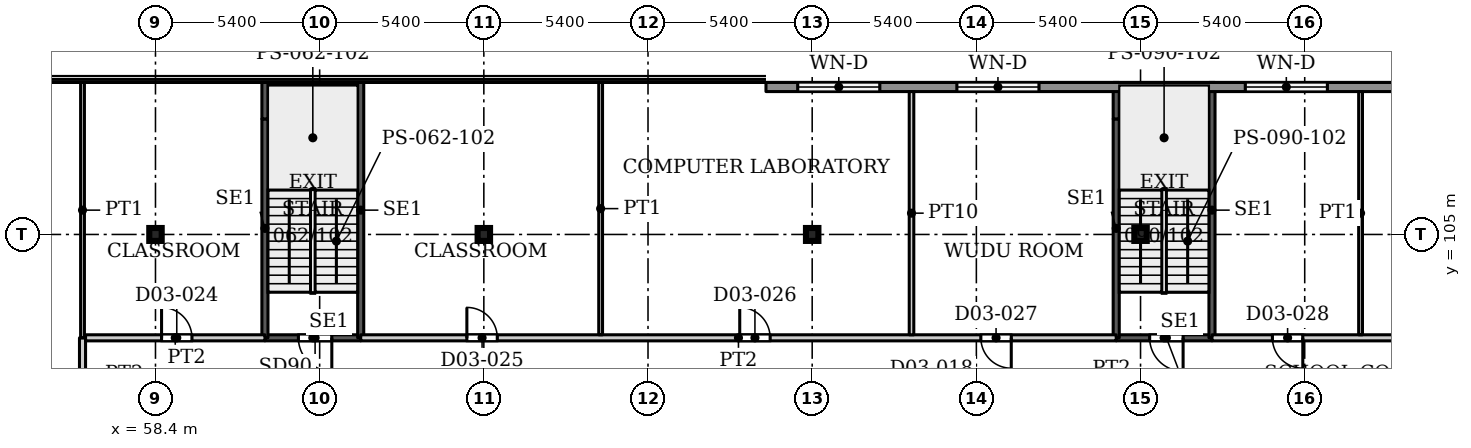
"""IFC4 building model, lengths in metres.
Left out: names, types, materials, properties, quantities, classifications, styles, units other than length and angle.
Written with IfcOpenShell. Run it as: python <this file> out.ifc"""

import sys

from ifc_helpers import new_model, si_unit, direction, frame, frame_2d, origin, origin_2d, place, context, subcontext, project, spatial, rectangle, i_section, extrude, source, transform, mapped, element, fill, save


model = new_model("IFC4")
c1 = context("Model", 3, precision=1e-05, world=origin(), true_north=direction((0.0, 1.0)))
c2 = subcontext(c1, "Body", "Model", "MODEL_VIEW")
j1 = project(units=[si_unit("LENGTHUNIT", "METRE"), si_unit("PLANEANGLEUNIT", "RADIAN")], contexts=[c1])
p1 = place(None, origin())
s1 = spatial("IfcSite", under=j1, at=p1, CompositionType="ELEMENT")
p2 = place(p1, origin())
s2 = spatial("IfcBuilding", under=s1, at=p2, CompositionType="ELEMENT")
p3 = place(p2, frame((0.0, 0.0, 17.0)))
s3 = spatial("IfcBuildingStorey", under=s2, at=p3, CompositionType="ELEMENT", Elevation=17.0)
for number, where, z_axis, x_axis in (
    (1, (58.4, 105.0, 0.0), (0.0, 0.0, 1.0), (1.0, 0.0, 0.0)),
    (2, (69.2, 105.0, 0.0), (0.0, 0.0, 1.0), (1.0, 0.0, 0.0)),
    (3, (80.0, 105.0, 0.0), (0.0, 0.0, 1.0), (1.0, 0.0, 0.0)),
    (4, (90.8, 105.0, 0.0), (0.0, 0.0, 1.0), (1.0, 0.0, 0.0)),
):
    element("IfcColumn", number, at=place(p3, frame(where, z_axis=z_axis, x_axis=x_axis)), inside=s3, PredefinedType="COLUMN", context=c2, shape_type="SweptSolid", body=[
        extrude(i_section(OverallWidth=0.409, OverallDepth=0.425, WebThickness=0.033, FlangeThickness=0.052, FilletRadius=0.013, at=origin_2d()), origin(), (0.0, 0.0, 1.0), 4.5),
    ])
p4 = place(p3, frame((78.48, 109.85, 0.0), z_axis=(0.0, 0.0, 1.0), x_axis=(1.0, 0.0, 0.0)))
e5 = element("IfcWall", 5, at=p4, inside=s3, PredefinedType="SOLIDWALL", context=c2, shape_type="SweptSolid", body=[
    extrude(rectangle(XDim=47.52, YDim=0.3, at=frame_2d((23.76, 0.0))), origin(), (0.0, 0.0, 1.0), 4.25),
])
p5 = place(p4, frame((1.045, 0.0, 0.9)))
e6 = element("IfcOpeningElement", 6, at=p5, cuts=e5, PredefinedType="OPENING", context=c2, shape_type="SweptSolid", body=[
    extrude(rectangle(XDim=2.7, YDim=2.1, at=frame_2d((1.35, 1.05))), frame((0.0, 0.16, 0.0), z_axis=(0.0, -1.0, 0.0), x_axis=(1.0, 0.0, 0.0)), (0.0, 0.0, 1.0), 0.32),
])
p6 = place(p4, frame((6.28, 0.0, 0.9)))
e7 = element("IfcOpeningElement", 7, at=p6, cuts=e5, PredefinedType="OPENING", context=c2, shape_type="SweptSolid", body=[
    extrude(rectangle(XDim=2.7, YDim=2.1, at=frame_2d((1.35, 1.05))), frame((0.0, 0.16, 0.0), z_axis=(0.0, -1.0, 0.0), x_axis=(1.0, 0.0, 0.0)), (0.0, 0.0, 1.0), 0.32),
])
p7 = place(p4, frame((15.765, 0.0, 0.9)))
e8 = element("IfcOpeningElement", 8, at=p7, cuts=e5, PredefinedType="OPENING", context=c2, shape_type="SweptSolid", body=[
    extrude(rectangle(XDim=2.7, YDim=2.1, at=frame_2d((1.35, 1.05))), frame((0.0, 0.16, 0.0), z_axis=(0.0, -1.0, 0.0), x_axis=(1.0, 0.0, 0.0)), (0.0, 0.0, 1.0), 0.32),
])
p8 = place(p4, frame((22.47, 0.0, 0.9)))
e9 = element("IfcOpeningElement", 9, at=p8, cuts=e5, PredefinedType="OPENING", context=c2, shape_type="SweptSolid", body=[
    extrude(rectangle(XDim=2.7, YDim=2.1, at=frame_2d((1.35, 1.05))), frame((0.0, 0.16, 0.0), z_axis=(0.0, -1.0, 0.0), x_axis=(1.0, 0.0, 0.0)), (0.0, 0.0, 1.0), 0.32),
])
p9 = place(p4, frame((30.99, 0.0, 0.9)))
e10 = element("IfcOpeningElement", 10, at=p9, cuts=e5, PredefinedType="OPENING", context=c2, shape_type="SweptSolid", body=[
    extrude(rectangle(XDim=2.7, YDim=2.1, at=frame_2d((1.35, 1.05))), frame((0.0, 0.16, 0.0), z_axis=(0.0, -1.0, 0.0), x_axis=(1.0, 0.0, 0.0)), (0.0, 0.0, 1.0), 0.32),
])
p10 = place(p4, frame((41.545, 0.0, 0.9)))
e11 = element("IfcOpeningElement", 11, at=p10, cuts=e5, PredefinedType="OPENING", context=c2, shape_type="SweptSolid", body=[
    extrude(rectangle(XDim=2.7, YDim=2.1, at=frame_2d((1.35, 1.05))), frame((0.0, 0.16, 0.0), z_axis=(0.0, -1.0, 0.0), x_axis=(1.0, 0.0, 0.0)), (0.0, 0.0, 1.0), 0.32),
])
p11 = place(p3, frame((62.0, 101.6, 0.0), z_axis=(0.0, 0.0, 1.0), x_axis=(1.0, 0.0, 0.0)))
e12 = element("IfcWall", 12, at=p11, inside=s3, PredefinedType="SHEAR", context=c2, shape_type="SweptSolid", body=[
    extrude(rectangle(XDim=3.15, YDim=0.2, at=frame_2d((1.575, 0.0))), origin(), (0.0, 0.0, 1.0), 4.5),
])
p12 = place(p11, frame((1.1, 0.0, 0.0)))
e13 = element("IfcOpeningElement", 13, at=p12, cuts=e12, PredefinedType="OPENING", context=c2, shape_type="SweptSolid", body=[
    extrude(rectangle(XDim=1.1, YDim=2.2, at=frame_2d((0.55, 1.1))), frame((0.0, 0.11, 0.0), z_axis=(0.0, -1.0, 0.0), x_axis=(1.0, 0.0, 0.0)), (0.0, 0.0, 1.0), 0.22),
])
p13 = place(p3, frame((62.0, 101.6, 0.0), z_axis=(0.0, 0.0, 1.0), x_axis=(0.0, 1.0, 0.0)))
e14 = element("IfcWall", 14, at=p13, inside=s3, PredefinedType="SHEAR", context=c2, shape_type="SweptSolid", body=[
    extrude(rectangle(XDim=7.2, YDim=0.2, at=frame_2d((3.6, 0.0))), origin(), (0.0, 0.0, 1.0), 4.5),
])
p14 = place(p3, frame((62.0, 108.8, 0.0), z_axis=(0.0, 0.0, 1.0), x_axis=(0.0, 1.0, 0.0)))
e15 = element("IfcWall", 15, at=p14, inside=s3, PredefinedType="SHEAR", context=c2, shape_type="SweptSolid", body=[
    extrude(rectangle(XDim=1.2, YDim=0.2, at=frame_2d((0.6, 0.0))), origin(), (0.0, 0.0, 1.0), 4.5),
])
p15 = place(p3, frame((65.15, 101.6, 0.0), z_axis=(0.0, 0.0, 1.0), x_axis=(0.0, 1.0, 0.0)))
e16 = element("IfcWall", 16, at=p15, inside=s3, PredefinedType="SHEAR", context=c2, shape_type="SweptSolid", body=[
    extrude(rectangle(XDim=8.4, YDim=0.2, at=frame_2d((4.2, 0.0))), origin(), (0.0, 0.0, 1.0), 4.5),
])
p16 = place(p3, frame((90.0, 101.6, 0.0), z_axis=(0.0, 0.0, 1.0), x_axis=(1.0, 0.0, 0.0)))
e17 = element("IfcWall", 17, at=p16, inside=s3, PredefinedType="SHEAR", context=c2, shape_type="SweptSolid", body=[
    extrude(rectangle(XDim=3.15, YDim=0.2, at=frame_2d((1.575, 0.0))), origin(), (0.0, 0.0, 1.0), 4.5),
])
p17 = place(p16, frame((1.1, 0.0, 0.0)))
e18 = element("IfcOpeningElement", 18, at=p17, cuts=e17, PredefinedType="OPENING", context=c2, shape_type="SweptSolid", body=[
    extrude(rectangle(XDim=1.1, YDim=2.2, at=frame_2d((0.55, 1.1))), frame((0.0, 0.11, 0.0), z_axis=(0.0, -1.0, 0.0), x_axis=(1.0, 0.0, 0.0)), (0.0, 0.0, 1.0), 0.22),
])
p18 = place(p3, frame((90.0, 101.6, 0.0), z_axis=(0.0, 0.0, 1.0), x_axis=(0.0, 1.0, 0.0)))
e19 = element("IfcWall", 19, at=p18, inside=s3, PredefinedType="SHEAR", context=c2, shape_type="SweptSolid", body=[
    extrude(rectangle(XDim=7.2, YDim=0.2, at=frame_2d((3.6, 0.0))), origin(), (0.0, 0.0, 1.0), 4.5),
])
p19 = place(p3, frame((90.0, 108.8, 0.0), z_axis=(0.0, 0.0, 1.0), x_axis=(0.0, 1.0, 0.0)))
e20 = element("IfcWall", 20, at=p19, inside=s3, PredefinedType="SHEAR", context=c2, shape_type="SweptSolid", body=[
    extrude(rectangle(XDim=1.2, YDim=0.2, at=frame_2d((0.6, 0.0))), origin(), (0.0, 0.0, 1.0), 4.5),
])
p20 = place(p3, frame((93.15, 101.6, 0.0), z_axis=(0.0, 0.0, 1.0), x_axis=(0.0, 1.0, 0.0)))
e21 = element("IfcWall", 21, at=p20, inside=s3, PredefinedType="SHEAR", context=c2, shape_type="SweptSolid", body=[
    extrude(rectangle(XDim=8.4, YDim=0.2, at=frame_2d((4.2, 0.0))), origin(), (0.0, 0.0, 1.0), 4.5),
])
p21 = place(p3, frame((56.0, 99.2, 0.0), z_axis=(0.0, 0.0, 1.0), x_axis=(0.0, 1.0, 0.0)))
e22 = element("IfcWall", 22, at=p21, inside=s3, PredefinedType="PARTITIONING", context=c2, shape_type="SweptSolid", body=[
    extrude(rectangle(XDim=2.4, YDim=0.2, at=frame_2d((1.2, 0.0))), origin(), (0.0, 0.0, 1.0), 4.18),
])
p22 = place(p3, frame((56.0, 101.6, 0.0), z_axis=(0.0, 0.0, 1.0), x_axis=(0.0, 1.0, 0.0)))
e23 = element("IfcWall", 23, at=p22, inside=s3, PredefinedType="PARTITIONING", context=c2, shape_type="SweptSolid", body=[
    extrude(rectangle(XDim=8.4, YDim=0.125, at=frame_2d((4.2, 0.0))), origin(), (0.0, 0.0, 1.0), 4.18),
])
p23 = place(p3, frame((56.1, 101.6, 0.0), z_axis=(0.0, 0.0, 1.0), x_axis=(1.0, 0.0, 0.0)))
e24 = element("IfcWall", 24, at=p23, inside=s3, PredefinedType="PARTITIONING", context=c2, shape_type="SweptSolid", body=[
    extrude(rectangle(XDim=5.9, YDim=0.2, at=frame_2d((2.95, 0.0))), origin(), (0.0, 0.0, 1.0), 4.18),
])
p24 = place(p23, frame((2.5, 0.0, 0.0)))
e25 = element("IfcOpeningElement", 25, at=p24, cuts=e24, PredefinedType="OPENING", context=c2, shape_type="SweptSolid", body=[
    extrude(rectangle(XDim=1.0, YDim=2.1, at=frame_2d((0.5, 1.05))), frame((0.0, 0.11, 0.0), z_axis=(0.0, -1.0, 0.0), x_axis=(1.0, 0.0, 0.0)), (0.0, 0.0, 1.0), 0.22),
])
p25 = place(p3, frame((65.15, 101.6, 0.0), z_axis=(0.0, 0.0, 1.0), x_axis=(1.0, 0.0, 0.0)))
e26 = element("IfcWall", 26, at=p25, inside=s3, PredefinedType="PARTITIONING", context=c2, shape_type="SweptSolid", body=[
    extrude(rectangle(XDim=24.85, YDim=0.2, at=frame_2d((12.425, 0.0))), origin(), (0.0, 0.0, 1.0), 4.18),
])
p26 = place(p25, frame((3.492, 0.0, 0.0)))
e27 = element("IfcOpeningElement", 27, at=p26, cuts=e26, PredefinedType="OPENING", context=c2, shape_type="SweptSolid", body=[
    extrude(rectangle(XDim=1.0, YDim=2.1, at=frame_2d((0.5, 1.05))), frame((0.0, 0.11, 0.0), z_axis=(0.0, -1.0, 0.0), x_axis=(1.0, 0.0, 0.0)), (0.0, 0.0, 1.0), 0.22),
])
p27 = place(p25, frame((12.467, 0.0, 0.0)))
e28 = element("IfcOpeningElement", 28, at=p27, cuts=e26, PredefinedType="OPENING", context=c2, shape_type="SweptSolid", body=[
    extrude(rectangle(XDim=1.0, YDim=2.1, at=frame_2d((0.5, 1.05))), frame((0.0, 0.11, 0.0), z_axis=(0.0, -1.0, 0.0), x_axis=(1.0, 0.0, 0.0)), (0.0, 0.0, 1.0), 0.22),
])
p28 = place(p25, frame((20.398, 0.0, 0.0)))
e29 = element("IfcOpeningElement", 29, at=p28, cuts=e26, PredefinedType="OPENING", context=c2, shape_type="SweptSolid", body=[
    extrude(rectangle(XDim=1.0, YDim=2.1, at=frame_2d((0.5, 1.05))), frame((0.0, 0.11, 0.0), z_axis=(0.0, -1.0, 0.0), x_axis=(1.0, 0.0, 0.0)), (0.0, 0.0, 1.0), 0.22),
])
p29 = place(p3, frame((73.042, 101.7, 0.0), z_axis=(0.0, 0.0, 1.0), x_axis=(0.0, 1.0, 0.0)))
e30 = element("IfcWall", 30, at=p29, inside=s3, PredefinedType="PARTITIONING", context=c2, shape_type="SweptSolid", body=[
    extrude(rectangle(XDim=8.3, YDim=0.125, at=frame_2d((4.15, 0.0))), origin(), (0.0, 0.0, 1.0), 4.18),
])
p30 = place(p3, frame((83.267, 101.7, 0.0), z_axis=(0.0, 0.0, 1.0), x_axis=(0.0, 1.0, 0.0)))
e31 = element("IfcWall", 31, at=p30, inside=s3, PredefinedType="PARTITIONING", context=c2, shape_type="SweptSolid", body=[
    extrude(rectangle(XDim=8.001, YDim=0.15, at=frame_2d((4.0, 0.0))), origin(), (0.0, 0.0, 1.0), 4.18),
])
p31 = place(p3, frame((93.15, 101.6, 0.0), z_axis=(0.0, 0.0, 1.0), x_axis=(1.0, 0.0, 0.0)))
e32 = element("IfcWall", 32, at=p31, inside=s3, PredefinedType="PARTITIONING", context=c2, shape_type="SweptSolid", body=[
    extrude(rectangle(XDim=22.85, YDim=0.2, at=frame_2d((11.425, 0.0))), origin(), (0.0, 0.0, 1.0), 4.18),
])
p32 = place(p31, frame((1.987, 0.0, 0.0)))
e33 = element("IfcOpeningElement", 33, at=p32, cuts=e32, PredefinedType="OPENING", context=c2, shape_type="SweptSolid", body=[
    extrude(rectangle(XDim=1.0, YDim=2.1, at=frame_2d((0.5, 1.05))), frame((0.0, 0.11, 0.0), z_axis=(0.0, -1.0, 0.0), x_axis=(1.0, 0.0, 0.0)), (0.0, 0.0, 1.0), 0.22),
])
p33 = place(p31, frame((8.758, 0.0, 0.0)))
e34 = element("IfcOpeningElement", 34, at=p33, cuts=e32, PredefinedType="OPENING", context=c2, shape_type="SweptSolid", body=[
    extrude(rectangle(XDim=1.0, YDim=2.1, at=frame_2d((0.5, 1.05))), frame((0.0, 0.11, 0.0), z_axis=(0.0, -1.0, 0.0), x_axis=(1.0, 0.0, 0.0)), (0.0, 0.0, 1.0), 0.22),
])
p34 = place(p31, frame((17.279, 0.0, 0.0)))
e35 = element("IfcOpeningElement", 35, at=p34, cuts=e32, PredefinedType="OPENING", context=c2, shape_type="SweptSolid", body=[
    extrude(rectangle(XDim=1.0, YDim=2.1, at=frame_2d((0.5, 1.05))), frame((0.0, 0.11, 0.0), z_axis=(0.0, -1.0, 0.0), x_axis=(1.0, 0.0, 0.0)), (0.0, 0.0, 1.0), 0.22),
])
p35 = place(p3, frame((98.037, 101.7, 0.0), z_axis=(0.0, 0.0, 1.0), x_axis=(0.0, 1.0, 0.0)))
e36 = element("IfcWall", 36, at=p35, inside=s3, PredefinedType="PARTITIONING", context=c2, shape_type="SweptSolid", body=[
    extrude(rectangle(XDim=8.001, YDim=0.125, at=frame_2d((4.0, 0.0))), origin(), (0.0, 0.0, 1.0), 4.18),
])
m1 = source(origin(), c2, "Body", "SweptSolid", [
    extrude(rectangle(XDim=2.7, YDim=2.1, at=frame_2d((1.35, 1.05))), frame((0.0, 0.03, 0.0), z_axis=(0.0, -1.0, 0.0), x_axis=(1.0, 0.0, 0.0)), (0.0, 0.0, 1.0), 0.06),
])
p36 = place(p5, origin())
e37 = element("IfcWindow", 37, at=p36, inside=s3, PartitioningType="SINGLE_PANEL", PredefinedType="WINDOW", context=c2, shape_type="MappedRepresentation", body=[
    mapped(m1, transform((0.0, 0.0, 0.0), x_axis=(1.0, 0.0, 0.0), y_axis=(0.0, 1.0, 0.0), z_axis=(0.0, 0.0, 1.0), scale=1.0)),
])
fill(e6, e37)
p37 = place(p6, origin())
e38 = element("IfcWindow", 38, at=p37, inside=s3, PartitioningType="SINGLE_PANEL", PredefinedType="WINDOW", context=c2, shape_type="MappedRepresentation", body=[
    mapped(m1, transform((0.0, 0.0, 0.0), x_axis=(1.0, 0.0, 0.0), y_axis=(0.0, 1.0, 0.0), z_axis=(0.0, 0.0, 1.0), scale=1.0)),
])
fill(e7, e38)
p38 = place(p7, origin())
e39 = element("IfcWindow", 39, at=p38, inside=s3, PartitioningType="SINGLE_PANEL", PredefinedType="WINDOW", context=c2, shape_type="MappedRepresentation", body=[
    mapped(m1, transform((0.0, 0.0, 0.0), x_axis=(1.0, 0.0, 0.0), y_axis=(0.0, 1.0, 0.0), z_axis=(0.0, 0.0, 1.0), scale=1.0)),
])
fill(e8, e39)
m2 = source(origin(), c2, "Body", "SweptSolid", [
    extrude(rectangle(XDim=1.1, YDim=2.2, at=frame_2d((0.55, 1.1))), frame((0.0, 0.025, 0.0), z_axis=(0.0, -1.0, 0.0), x_axis=(1.0, 0.0, 0.0)), (0.0, 0.0, 1.0), 0.05),
])
p39 = place(p12, origin())
e40 = element("IfcDoor", 40, at=p39, inside=s3, OperationType="SINGLE_SWING_RIGHT", PredefinedType="DOOR", context=c2, shape_type="MappedRepresentation", body=[
    mapped(m2, transform((0.0, 0.0, 0.0), x_axis=(1.0, 0.0, 0.0), y_axis=(0.0, 1.0, 0.0), z_axis=(0.0, 0.0, 1.0), scale=1.0)),
])
fill(e13, e40)
p40 = place(p17, origin())
e41 = element("IfcDoor", 41, at=p40, inside=s3, OperationType="SINGLE_SWING_RIGHT", PredefinedType="DOOR", context=c2, shape_type="MappedRepresentation", body=[
    mapped(m2, transform((0.0, 0.0, 0.0), x_axis=(1.0, 0.0, 0.0), y_axis=(0.0, 1.0, 0.0), z_axis=(0.0, 0.0, 1.0), scale=1.0)),
])
fill(e18, e41)
m3 = source(origin(), c2, "Body", "SweptSolid", [
    extrude(rectangle(XDim=1.0, YDim=2.1, at=frame_2d((0.5, 1.05))), frame((0.0, 0.025, 0.0), z_axis=(0.0, -1.0, 0.0), x_axis=(1.0, 0.0, 0.0)), (0.0, 0.0, 1.0), 0.05),
])
p41 = place(p24, origin())
e42 = element("IfcDoor", 42, at=p41, inside=s3, OperationType="SINGLE_SWING_LEFT", PredefinedType="DOOR", context=c2, shape_type="MappedRepresentation", body=[
    mapped(m3, transform((0.0, 0.0, 0.0), x_axis=(1.0, 0.0, 0.0), y_axis=(0.0, 1.0, 0.0), z_axis=(0.0, 0.0, 1.0), scale=1.0)),
])
fill(e25, e42)
p42 = place(p26, origin())
e43 = element("IfcDoor", 43, at=p42, inside=s3, OperationType="SINGLE_SWING_LEFT", PredefinedType="DOOR", context=c2, shape_type="MappedRepresentation", body=[
    mapped(m3, transform((0.0, 0.0, 0.0), x_axis=(1.0, 0.0, 0.0), y_axis=(0.0, 1.0, 0.0), z_axis=(0.0, 0.0, 1.0), scale=1.0)),
])
fill(e27, e43)
p43 = place(p27, origin())
e44 = element("IfcDoor", 44, at=p43, inside=s3, OperationType="SINGLE_SWING_LEFT", PredefinedType="DOOR", context=c2, shape_type="MappedRepresentation", body=[
    mapped(m3, transform((0.0, 0.0, 0.0), x_axis=(1.0, 0.0, 0.0), y_axis=(0.0, 1.0, 0.0), z_axis=(0.0, 0.0, 1.0), scale=1.0)),
])
fill(e28, e44)
p44 = place(p28, origin())
e45 = element("IfcDoor", 45, at=p44, inside=s3, OperationType="SINGLE_SWING_RIGHT", PredefinedType="DOOR", context=c2, shape_type="MappedRepresentation", body=[
    mapped(m3, transform((0.0, 0.0, 0.0), x_axis=(1.0, 0.0, 0.0), y_axis=(0.0, 1.0, 0.0), z_axis=(0.0, 0.0, 1.0), scale=1.0)),
])
fill(e29, e45)
p45 = place(p32, origin())
e46 = element("IfcDoor", 46, at=p45, inside=s3, OperationType="SINGLE_SWING_RIGHT", PredefinedType="DOOR", context=c2, shape_type="MappedRepresentation", body=[
    mapped(m3, transform((0.0, 0.0, 0.0), x_axis=(1.0, 0.0, 0.0), y_axis=(0.0, 1.0, 0.0), z_axis=(0.0, 0.0, 1.0), scale=1.0)),
])
fill(e33, e46)
save(model, sys.argv[1])
